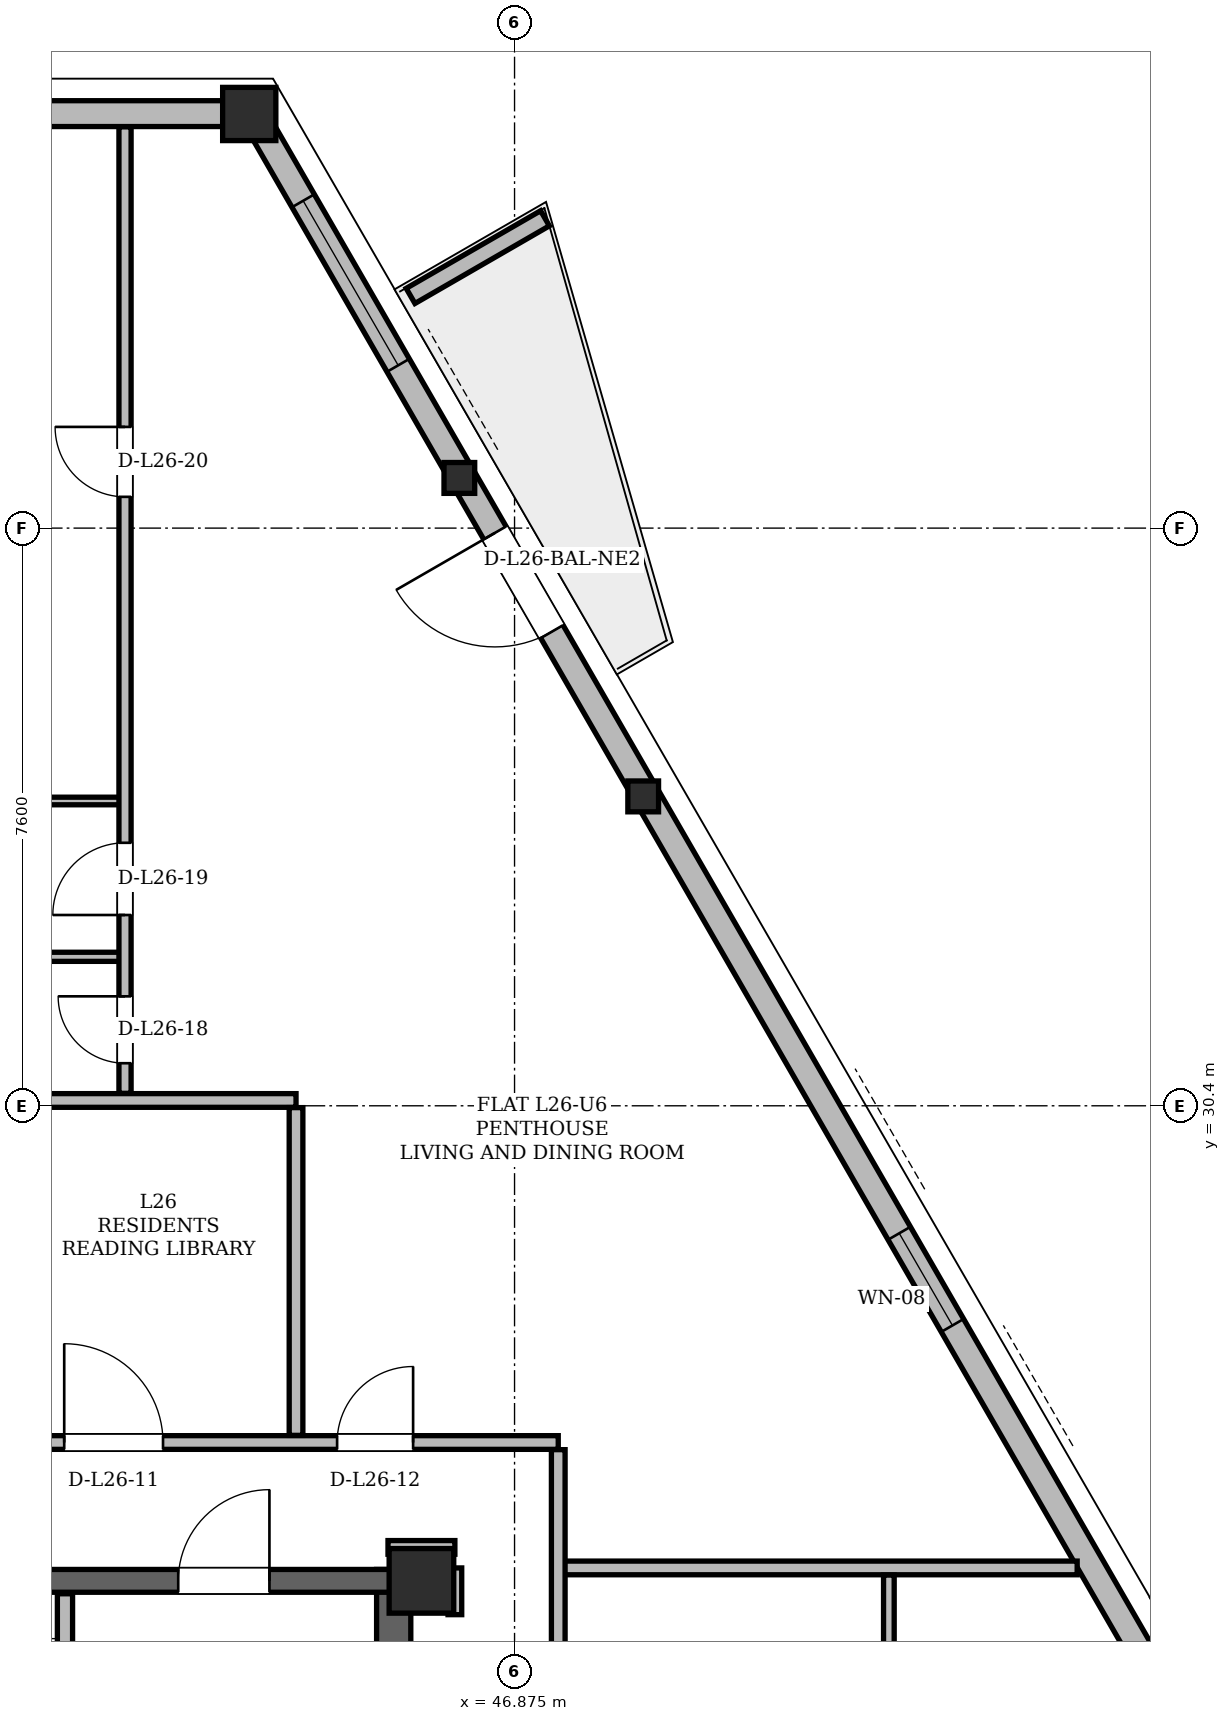
"""IFC4 building model, lengths in metres.
Left out: names, types, materials, properties, quantities, classifications, styles, units other than length and angle.
Written with IfcOpenShell. Run it as: python <this file> out.ifc"""

import sys

from ifc_helpers import new_model, si_unit, direction, frame, frame_2d, origin, origin_2d, place, context, subcontext, project, spatial, polyline, rectangle, hollow_rectangle, i_section, outline, extrude, element, fill, save


model = new_model("IFC4")
c1 = context("Model", 3, precision=1e-05, world=origin(), true_north=direction((0.0, 1.0)))
c2 = subcontext(c1, "Body", "Model", "MODEL_VIEW")
j1 = project(units=[si_unit("LENGTHUNIT", "METRE"), si_unit("PLANEANGLEUNIT", "RADIAN")], contexts=[c1])
p1 = place(None, origin())
s1 = spatial("IfcSite", under=j1, at=p1, CompositionType="ELEMENT")
p2 = place(p1, origin())
s2 = spatial("IfcBuilding", under=s1, at=p2, CompositionType="ELEMENT")
p3 = place(p2, frame((0.0, 0.0, 100.5)))
s3 = spatial("IfcBuildingStorey", under=s2, at=p3, CompositionType="ELEMENT", Elevation=100.5)
p4 = place(p3, frame((45.65, 24.15, 0.0), z_axis=(0.0, 0.0, 1.0), x_axis=(1.0, 0.0, 0.0)))
e1 = element("IfcColumn", 1, at=p4, inside=s3, PredefinedType="COLUMN", context=c2, shape_type="SweptSolid", body=[
    extrude(hollow_rectangle(XDim=0.85, YDim=0.85, WallThickness=0.07, at=origin_2d()), origin(), (0.0, 0.0, 1.0), 3.6),
])
p5 = place(p3, frame((43.432, 43.453, 0.004), z_axis=(-0.026437061593, -0.002582540721, 0.999647143875), x_axis=(0.097223592457, -0.995262564889, 0.0)))
e2 = element("IfcColumn", 2, at=p5, inside=s3, PredefinedType="COLUMN", context=c2, shape_type="SweptSolid", body=[
    extrude(hollow_rectangle(XDim=0.7, YDim=0.7, WallThickness=0.055, at=origin_2d()), origin(), (0.0, 0.0, 1.0), 3.592),
])
p6 = place(p3, frame((48.609, 34.485, 0.004), z_axis=(-0.023176047894, -0.00835968883, 0.999696447131), x_axis=(0.339305503404, -0.940676233015, 0.0)))
e3 = element("IfcColumn", 3, at=p6, inside=s3, PredefinedType="COLUMN", context=c2, shape_type="SweptSolid", body=[
    extrude(i_section(OverallWidth=0.404, OverallDepth=0.406, WebThickness=0.027, FlangeThickness=0.044, at=origin_2d()), origin(), (0.0, 0.0, 1.0), 3.592),
])
p7 = place(p3, frame((46.193, 38.67, 0.004), z_axis=(-0.024670863801, -0.005640996406, 0.999679712527), x_axis=(0.222897720207, -0.97484183657, 0.0)))
e4 = element("IfcColumn", 4, at=p7, inside=s3, PredefinedType="COLUMN", context=c2, shape_type="SweptSolid", body=[
    extrude(i_section(OverallWidth=0.404, OverallDepth=0.406, WebThickness=0.027, FlangeThickness=0.044, at=origin_2d()), origin(), (0.0, 0.0, 1.0), 3.592),
])
p8 = place(p3, frame((45.285, 11.0, 0.0), z_axis=(0.0, 0.0, 1.0), x_axis=(0.0, 1.0, 0.0)))
e5 = element("IfcWall", 5, at=p8, inside=s3, PredefinedType="SHEAR", context=c2, shape_type="SweptSolid", body=[
    extrude(rectangle(XDim=13.3, YDim=0.45, at=frame_2d((6.65, 0.0))), origin(), (0.0, 0.0, 1.0), 3.36),
])
p9 = place(p3, frame((29.65, 24.15, 0.0), z_axis=(0.0, 0.0, 1.0), x_axis=(1.0, 0.0, 0.0)))
e6 = element("IfcWall", 6, at=p9, inside=s3, PredefinedType="SHEAR", context=c2, shape_type="SweptSolid", body=[
    extrude(rectangle(XDim=15.7, YDim=0.3, at=frame_2d((7.85, 0.0))), origin(), (0.0, 0.0, 1.0), 3.36),
])
p10 = place(p9, frame((1.7, 0.0, 0.0)))
e7 = element("IfcOpeningElement", 7, at=p10, cuts=e6, PredefinedType="OPENING", context=c2, shape_type="SweptSolid", body=[
    extrude(rectangle(XDim=1.2, YDim=2.2, at=frame_2d((0.6, 1.1))), frame((0.0, 0.15, 0.0), z_axis=(0.0, -1.0, 0.0), x_axis=(1.0, 0.0, 0.0)), (0.0, 0.0, 1.0), 0.3),
])
p11 = place(p9, frame((12.8, 0.0, 0.0)))
e8 = element("IfcOpeningElement", 8, at=p11, cuts=e6, PredefinedType="OPENING", context=c2, shape_type="SweptSolid", body=[
    extrude(rectangle(XDim=1.2, YDim=2.2, at=frame_2d((0.6, 1.1))), frame((0.0, 0.15, 0.0), z_axis=(0.0, -1.0, 0.0), x_axis=(1.0, 0.0, 0.0)), (0.0, 0.0, 1.0), 0.3),
])
p12 = place(p9, frame((7.4, 0.0, 0.0)))
e9 = element("IfcOpeningElement", 9, at=p12, cuts=e6, PredefinedType="OPENING", context=c2, shape_type="SweptSolid", body=[
    extrude(rectangle(XDim=0.9, YDim=2.05, at=frame_2d((0.45, 1.025))), frame((0.0, 0.15, 0.0), z_axis=(0.0, -1.0, 0.0), x_axis=(1.0, 0.0, 0.0)), (0.0, 0.0, 1.0), 0.3),
])
p13 = place(p3, frame((60.69, 13.561, 0.0), z_axis=(0.0, 0.0, 1.0), x_axis=(-0.500002056916, 0.86602421622, 0.0)))
e10 = element("IfcWall", 10, at=p13, inside=s3, PredefinedType="SOLIDWALL", context=c2, shape_type="SweptSolid", body=[
    extrude(rectangle(XDim=34.516, YDim=0.34, at=frame_2d((17.258, 0.0))), origin(), (0.0, 0.0, 1.0), 2.578),
])
p14 = place(p13, frame((8.034, 0.0, 0.0)))
e11 = element("IfcOpeningElement", 11, at=p14, cuts=e10, PredefinedType="OPENING", context=c2, shape_type="SweptSolid", body=[
    extrude(rectangle(XDim=1.5, YDim=2.2, at=frame_2d((0.75, 1.1))), frame((0.0, 0.17, 0.0), z_axis=(0.0, -1.0, 0.0), x_axis=(1.0, 0.0, 0.0)), (0.0, 0.0, 1.0), 0.34),
])
p15 = place(p13, frame((26.647, 0.0, 0.0)))
e12 = element("IfcOpeningElement", 12, at=p15, cuts=e10, PredefinedType="OPENING", context=c2, shape_type="SweptSolid", body=[
    extrude(rectangle(XDim=1.5, YDim=2.2, at=frame_2d((0.75, 1.1))), frame((0.0, 0.17, 0.0), z_axis=(0.0, -1.0, 0.0), x_axis=(1.0, 0.0, 0.0)), (0.0, 0.0, 1.0), 0.34),
])
p16 = place(p13, frame((1.477, 0.0, 0.85)))
e13 = element("IfcOpeningElement", 13, at=p16, cuts=e10, PredefinedType="OPENING", context=c2, shape_type="SweptSolid", body=[
    extrude(rectangle(XDim=2.5, YDim=1.618, at=frame_2d((1.25, 0.809))), frame((0.0, 0.17, 0.0), z_axis=(0.0, -1.0, 0.0), x_axis=(1.0, 0.0, 0.0)), (0.0, 0.0, 1.0), 0.34),
])
p17 = place(p13, frame((16.107, 0.0, 0.85)))
e14 = element("IfcOpeningElement", 14, at=p17, cuts=e10, PredefinedType="OPENING", context=c2, shape_type="SweptSolid", body=[
    extrude(rectangle(XDim=1.4, YDim=1.6, at=frame_2d((0.7, 0.8))), frame((0.0, 0.17, 0.0), z_axis=(0.0, -1.0, 0.0), x_axis=(1.0, 0.0, 0.0)), (0.0, 0.0, 1.0), 0.34),
])
p18 = place(p13, frame((30.693, 0.0, 0.85)))
e15 = element("IfcOpeningElement", 15, at=p18, cuts=e10, PredefinedType="OPENING", context=c2, shape_type="SweptSolid", body=[
    extrude(rectangle(XDim=2.5, YDim=1.618, at=frame_2d((1.25, 0.809))), frame((0.0, 0.17, 0.0), z_axis=(0.0, -1.0, 0.0), x_axis=(1.0, 0.0, 0.0)), (0.0, 0.0, 1.0), 0.34),
])
p19 = place(p3, frame((43.432, 43.453, 0.0), z_axis=(0.0, 0.0, 1.0), x_axis=(-1.0, 0.0, 0.0)))
e16 = element("IfcWall", 16, at=p19, inside=s3, PredefinedType="SOLIDWALL", context=c2, shape_type="SweptSolid", body=[
    extrude(rectangle(XDim=11.864, YDim=0.34, at=frame_2d((5.932, 0.0))), origin(), (0.0, 0.0, 1.0), 2.578),
])
p20 = place(p19, frame((4.567, 0.0, 0.85)))
e17 = element("IfcOpeningElement", 17, at=p20, cuts=e16, PredefinedType="OPENING", context=c2, shape_type="SweptSolid", body=[
    extrude(rectangle(XDim=0.9, YDim=1.15, at=frame_2d((0.45, 0.575))), frame((0.0, 0.17, 0.0), z_axis=(0.0, -1.0, 0.0), x_axis=(1.0, 0.0, 0.0)), (0.0, 0.0, 1.0), 0.34),
])
p21 = place(p3, frame((45.507, 41.055, 0.0), z_axis=(0.0, 0.0, 1.0), x_axis=(0.866012356593, 0.500022597718, 0.0)))
e18 = element("IfcWall", 18, at=p21, inside=s3, PredefinedType="PARAPET", context=c2, shape_type="SweptSolid", body=[
    extrude(outline(polyline([(0.0, 0.0), (2.042, 0.0), (2.042, 1.1), (0.0, 1.32), (0.0, 0.0)])), frame((0.0, 0.115, 0.0), z_axis=(0.0, -1.0, 0.0), x_axis=(1.0, 0.0, 0.0)), (0.0, 0.0, 1.0), 0.23),
])
p22 = place(p3, frame((40.96, 19.48, 0.0), z_axis=(0.0, 0.0, 1.0), x_axis=(0.0, 1.0, 0.0)))
e19 = element("IfcWall", 19, at=p22, inside=s3, PredefinedType="PARTITIONING", context=c2, shape_type="SweptSolid", body=[
    extrude(rectangle(XDim=4.5, YDim=0.2, at=frame_2d((2.25, 0.0))), origin(), (0.0, 0.0, 1.0), 2.4),
])
p23 = place(p22, frame((2.12, 0.0, 0.0)))
e20 = element("IfcOpeningElement", 20, at=p23, cuts=e19, PredefinedType="OPENING", context=c2, shape_type="SweptSolid", body=[
    extrude(rectangle(XDim=1.1, YDim=2.2, at=frame_2d((0.55, 1.1))), frame((0.0, 0.1, 0.0), z_axis=(0.0, -1.0, 0.0), x_axis=(1.0, 0.0, 0.0)), (0.0, 0.0, 1.0), 0.2),
])
p24 = place(p3, frame((47.45, 24.32, 0.0), z_axis=(0.0, 0.0, 1.0), x_axis=(1.0, 0.0, 0.0)))
e21 = element("IfcWall", 21, at=p24, inside=s3, PredefinedType="PARTITIONING", context=c2, shape_type="SweptSolid", body=[
    extrude(rectangle(XDim=6.827, YDim=0.18, at=frame_2d((3.414, 0.0))), origin(), (0.0, 0.0, 1.0), 3.36),
])
p25 = place(p3, frame((45.21, 24.59, 0.0), z_axis=(0.0, 0.0, 1.0), x_axis=(1.0, 0.0, 0.0)))
e22 = element("IfcWall", 22, at=p25, inside=s3, PredefinedType="PARTITIONING", context=c2, shape_type="SweptSolid", body=[
    extrude(rectangle(XDim=0.88, YDim=0.18, at=frame_2d((0.44, 0.0))), origin(), (0.0, 0.0, 1.0), 2.814),
])
p26 = place(p3, frame((27.55, 25.97, 0.0), z_axis=(0.0, 0.0, 1.0), x_axis=(1.0, 0.0, 0.0)))
e23 = element("IfcWall", 23, at=p26, inside=s3, PredefinedType="PARTITIONING", context=c2, shape_type="SweptSolid", body=[
    extrude(rectangle(XDim=19.9, YDim=0.18, at=frame_2d((9.95, 0.0))), origin(), (0.0, 0.0, 1.0), 2.814),
])
p27 = place(p26, frame((4.446, 0.0, 0.0)))
e24 = element("IfcOpeningElement", 24, at=p27, cuts=e23, PredefinedType="OPENING", context=c2, shape_type="SweptSolid", body=[
    extrude(rectangle(XDim=1.0, YDim=2.18, at=frame_2d((0.5, 1.09))), frame((0.0, 0.09, 0.0), z_axis=(0.0, -1.0, 0.0), x_axis=(1.0, 0.0, 0.0)), (0.0, 0.0, 1.0), 0.18),
])
p28 = place(p26, frame((13.4, 0.0, 0.0)))
e25 = element("IfcOpeningElement", 25, at=p28, cuts=e23, PredefinedType="OPENING", context=c2, shape_type="SweptSolid", body=[
    extrude(rectangle(XDim=1.3, YDim=2.2, at=frame_2d((0.65, 1.1))), frame((0.0, 0.09, 0.0), z_axis=(0.0, -1.0, 0.0), x_axis=(1.0, 0.0, 0.0)), (0.0, 0.0, 1.0), 0.18),
])
p29 = place(p26, frame((16.99, 0.0, 0.0)))
e26 = element("IfcOpeningElement", 26, at=p29, cuts=e23, PredefinedType="OPENING", context=c2, shape_type="SweptSolid", body=[
    extrude(rectangle(XDim=1.0, YDim=2.18, at=frame_2d((0.5, 1.09))), frame((0.0, 0.09, 0.0), z_axis=(0.0, -1.0, 0.0), x_axis=(1.0, 0.0, 0.0)), (0.0, 0.0, 1.0), 0.18),
])
p30 = place(p3, frame((39.2, 30.47, 0.0), z_axis=(0.0, 0.0, 1.0), x_axis=(1.0, 0.0, 0.0)))
e27 = element("IfcWall", 27, at=p30, inside=s3, PredefinedType="PARTITIONING", context=c2, shape_type="SweptSolid", body=[
    extrude(rectangle(XDim=4.8, YDim=0.18, at=frame_2d((2.4, 0.0))), origin(), (0.0, 0.0, 1.0), 3.36),
])
p31 = place(p3, frame((37.35, 32.36, 0.0), z_axis=(0.0, 0.0, 1.0), x_axis=(1.0, 0.0, 0.0)))
e28 = element("IfcWall", 28, at=p31, inside=s3, PredefinedType="PARTITIONING", context=c2, shape_type="SweptSolid", body=[
    extrude(rectangle(XDim=4.4, YDim=0.12, at=frame_2d((2.2, 0.0))), origin(), (0.0, 0.0, 1.0), 3.36),
])
p32 = place(p3, frame((37.35, 34.41, 0.0), z_axis=(0.0, 0.0, 1.0), x_axis=(1.0, 0.0, 0.0)))
e29 = element("IfcWall", 29, at=p32, inside=s3, PredefinedType="PARTITIONING", context=c2, shape_type="SweptSolid", body=[
    extrude(rectangle(XDim=4.4, YDim=0.1, at=frame_2d((2.2, 0.0))), origin(), (0.0, 0.0, 1.0), 3.36),
])
p33 = place(p3, frame((41.75, 30.564, 0.0), z_axis=(0.0, 0.0, 1.0), x_axis=(0.0, 1.0, 0.0)))
e30 = element("IfcWall", 30, at=p33, inside=s3, PredefinedType="PARTITIONING", context=c2, shape_type="SweptSolid", body=[
    extrude(rectangle(XDim=12.715, YDim=0.16, at=frame_2d((6.357, 0.0))), origin(), (0.0, 0.0, 1.0), 3.36),
])
p34 = place(p33, frame((0.396, 0.0, 0.0)))
e31 = element("IfcOpeningElement", 31, at=p34, cuts=e30, PredefinedType="OPENING", context=c2, shape_type="SweptSolid", body=[
    extrude(rectangle(XDim=0.88, YDim=2.08, at=frame_2d((0.44, 1.04))), frame((0.0, 0.08, 0.0), z_axis=(0.0, -1.0, 0.0), x_axis=(1.0, 0.0, 0.0)), (0.0, 0.0, 1.0), 0.16),
])
p35 = place(p33, frame((2.346, 0.0, 0.0)))
e32 = element("IfcOpeningElement", 32, at=p35, cuts=e30, PredefinedType="OPENING", context=c2, shape_type="SweptSolid", body=[
    extrude(rectangle(XDim=0.95, YDim=2.1, at=frame_2d((0.475, 1.05))), frame((0.0, 0.08, 0.0), z_axis=(0.0, -1.0, 0.0), x_axis=(1.0, 0.0, 0.0)), (0.0, 0.0, 1.0), 0.16),
])
p36 = place(p33, frame((7.847, 0.0, 0.0)))
e33 = element("IfcOpeningElement", 33, at=p36, cuts=e30, PredefinedType="OPENING", context=c2, shape_type="SweptSolid", body=[
    extrude(rectangle(XDim=0.92, YDim=2.12, at=frame_2d((0.46, 1.06))), frame((0.0, 0.08, 0.0), z_axis=(0.0, -1.0, 0.0), x_axis=(1.0, 0.0, 0.0)), (0.0, 0.0, 1.0), 0.16),
])
p37 = place(p3, frame((44.0, 26.064, 0.0), z_axis=(0.0, 0.0, 1.0), x_axis=(0.0, 1.0, 0.0)))
e34 = element("IfcWall", 34, at=p37, inside=s3, PredefinedType="PARTITIONING", context=c2, shape_type="SweptSolid", body=[
    extrude(rectangle(XDim=4.312, YDim=0.18, at=frame_2d((2.156, 0.0))), origin(), (0.0, 0.0, 1.0), 2.946),
])
p38 = place(p3, frame((46.09, 23.705, 0.0), z_axis=(0.0, 0.0, 1.0), x_axis=(0.0, 1.0, 0.0)))
e35 = element("IfcWall", 35, at=p38, inside=s3, PredefinedType="PARTITIONING", context=c2, shape_type="SweptSolid", body=[
    extrude(rectangle(XDim=0.615, YDim=0.18, at=frame_2d((0.308, 0.0))), origin(), (0.0, 0.0, 1.0), 2.946),
])
p39 = place(p3, frame((47.45, 11.044, 0.0), z_axis=(0.0, 0.0, 1.0), x_axis=(0.0, 1.0, 0.0)))
e36 = element("IfcWall", 36, at=p39, inside=s3, PredefinedType="PARTITIONING", context=c2, shape_type="SweptSolid", body=[
    extrude(rectangle(XDim=14.832, YDim=0.18, at=frame_2d((7.416, 0.0))), origin(), (0.0, 0.0, 1.0), 2.814),
])
p40 = place(p3, frame((51.8, 11.044, 0.0), z_axis=(0.0, 0.0, 1.0), x_axis=(0.0, 1.0, 0.0)))
e37 = element("IfcWall", 37, at=p40, inside=s3, PredefinedType="PARTITIONING", context=c2, shape_type="SweptSolid", body=[
    extrude(rectangle(XDim=13.182, YDim=0.14, at=frame_2d((6.591, 0.0))), origin(), (0.0, 0.0, 1.0), 2.814),
])
p41 = place(p40, frame((0.396, 0.0, 0.0)))
e38 = element("IfcOpeningElement", 38, at=p41, cuts=e37, PredefinedType="OPENING", context=c2, shape_type="SweptSolid", body=[
    extrude(rectangle(XDim=0.88, YDim=2.08, at=frame_2d((0.44, 1.04))), frame((0.0, 0.07, 0.0), z_axis=(0.0, -1.0, 0.0), x_axis=(1.0, 0.0, 0.0)), (0.0, 0.0, 1.0), 0.14),
])
p42 = place(p40, frame((2.346, 0.0, 0.0)))
e39 = element("IfcOpeningElement", 39, at=p42, cuts=e37, PredefinedType="OPENING", context=c2, shape_type="SweptSolid", body=[
    extrude(rectangle(XDim=0.95, YDim=2.1, at=frame_2d((0.475, 1.05))), frame((0.0, 0.07, 0.0), z_axis=(0.0, -1.0, 0.0), x_axis=(1.0, 0.0, 0.0)), (0.0, 0.0, 1.0), 0.14),
])
p43 = place(p40, frame((8.116, 0.0, 0.0)))
e40 = element("IfcOpeningElement", 40, at=p43, cuts=e37, PredefinedType="OPENING", context=c2, shape_type="SweptSolid", body=[
    extrude(rectangle(XDim=0.92, YDim=2.12, at=frame_2d((0.46, 1.06))), frame((0.0, 0.07, 0.0), z_axis=(0.0, -1.0, 0.0), x_axis=(1.0, 0.0, 0.0)), (0.0, 0.0, 1.0), 0.14),
])
p44 = place(p15, origin())
e41 = element("IfcDoor", 41, at=p44, inside=s3, OperationType="SINGLE_SWING_RIGHT", PredefinedType="DOOR", context=c2, shape_type="SweptSolid", body=[
    extrude(rectangle(XDim=1.5, YDim=2.2, at=frame_2d((0.75, 1.1))), frame((0.0, 0.025, 0.0), z_axis=(0.0, -1.0, 0.0), x_axis=(1.0, 0.0, 0.0)), (0.0, 0.0, 1.0), 0.05),
])
fill(e12, e41)
p45 = place(p17, origin())
e42 = element("IfcWindow", 42, at=p45, inside=s3, PartitioningType="SINGLE_PANEL", PredefinedType="WINDOW", context=c2, shape_type="SweptSolid", body=[
    extrude(rectangle(XDim=1.4, YDim=1.6, at=frame_2d((0.7, 0.8))), frame((0.0, 0.03, 0.0), z_axis=(0.0, -1.0, 0.0), x_axis=(1.0, 0.0, 0.0)), (0.0, 0.0, 1.0), 0.06),
])
fill(e14, e42)
p46 = place(p18, origin())
e43 = element("IfcWindow", 43, at=p46, inside=s3, PartitioningType="SINGLE_PANEL", PredefinedType="WINDOW", context=c2, shape_type="SweptSolid", body=[
    extrude(rectangle(XDim=2.5, YDim=1.618, at=frame_2d((1.25, 0.809))), frame((0.0, 0.03, 0.0), z_axis=(0.0, -1.0, 0.0), x_axis=(1.0, 0.0, 0.0)), (0.0, 0.0, 1.0), 0.06),
])
fill(e15, e43)
p47 = place(p11, origin())
e44 = element("IfcDoor", 44, at=p47, inside=s3, OperationType="SINGLE_SWING_RIGHT", PredefinedType="DOOR", context=c2, shape_type="SweptSolid", body=[
    extrude(rectangle(XDim=1.2, YDim=2.2, at=frame_2d((0.6, 1.1))), frame((0.0, 0.025, 0.0), z_axis=(0.0, -1.0, 0.0), x_axis=(1.0, 0.0, 0.0)), (0.0, 0.0, 1.0), 0.05),
])
fill(e8, e44)
p48 = place(p28, origin())
e45 = element("IfcDoor", 45, at=p48, inside=s3, OperationType="SINGLE_SWING_LEFT", PredefinedType="DOOR", context=c2, shape_type="SweptSolid", body=[
    extrude(rectangle(XDim=1.3, YDim=2.2, at=frame_2d((0.65, 1.1))), frame((0.0, 0.025, 0.0), z_axis=(0.0, -1.0, 0.0), x_axis=(1.0, 0.0, 0.0)), (0.0, 0.0, 1.0), 0.05),
])
fill(e25, e45)
p49 = place(p29, origin())
e46 = element("IfcDoor", 46, at=p49, inside=s3, OperationType="SINGLE_SWING_RIGHT", PredefinedType="DOOR", context=c2, shape_type="SweptSolid", body=[
    extrude(rectangle(XDim=1.0, YDim=2.18, at=frame_2d((0.5, 1.09))), frame((0.0, 0.025, 0.0), z_axis=(0.0, -1.0, 0.0), x_axis=(1.0, 0.0, 0.0)), (0.0, 0.0, 1.0), 0.05),
])
fill(e26, e46)
p50 = place(p34, origin())
e47 = element("IfcDoor", 47, at=p50, inside=s3, OperationType="SINGLE_SWING_RIGHT", PredefinedType="DOOR", context=c2, shape_type="SweptSolid", body=[
    extrude(rectangle(XDim=0.88, YDim=2.08, at=frame_2d((0.44, 1.04))), frame((0.0, 0.025, 0.0), z_axis=(0.0, -1.0, 0.0), x_axis=(1.0, 0.0, 0.0)), (0.0, 0.0, 1.0), 0.05),
])
fill(e31, e47)
p51 = place(p35, origin())
e48 = element("IfcDoor", 48, at=p51, inside=s3, OperationType="SINGLE_SWING_LEFT", PredefinedType="DOOR", context=c2, shape_type="SweptSolid", body=[
    extrude(rectangle(XDim=0.95, YDim=2.1, at=frame_2d((0.475, 1.05))), frame((0.0, 0.025, 0.0), z_axis=(0.0, -1.0, 0.0), x_axis=(1.0, 0.0, 0.0)), (0.0, 0.0, 1.0), 0.05),
])
fill(e32, e48)
p52 = place(p36, origin())
e49 = element("IfcDoor", 49, at=p52, inside=s3, OperationType="SINGLE_SWING_RIGHT", PredefinedType="DOOR", context=c2, shape_type="SweptSolid", body=[
    extrude(rectangle(XDim=0.92, YDim=2.12, at=frame_2d((0.46, 1.06))), frame((0.0, 0.025, 0.0), z_axis=(0.0, -1.0, 0.0), x_axis=(1.0, 0.0, 0.0)), (0.0, 0.0, 1.0), 0.05),
])
fill(e33, e49)
save(model, sys.argv[1])
